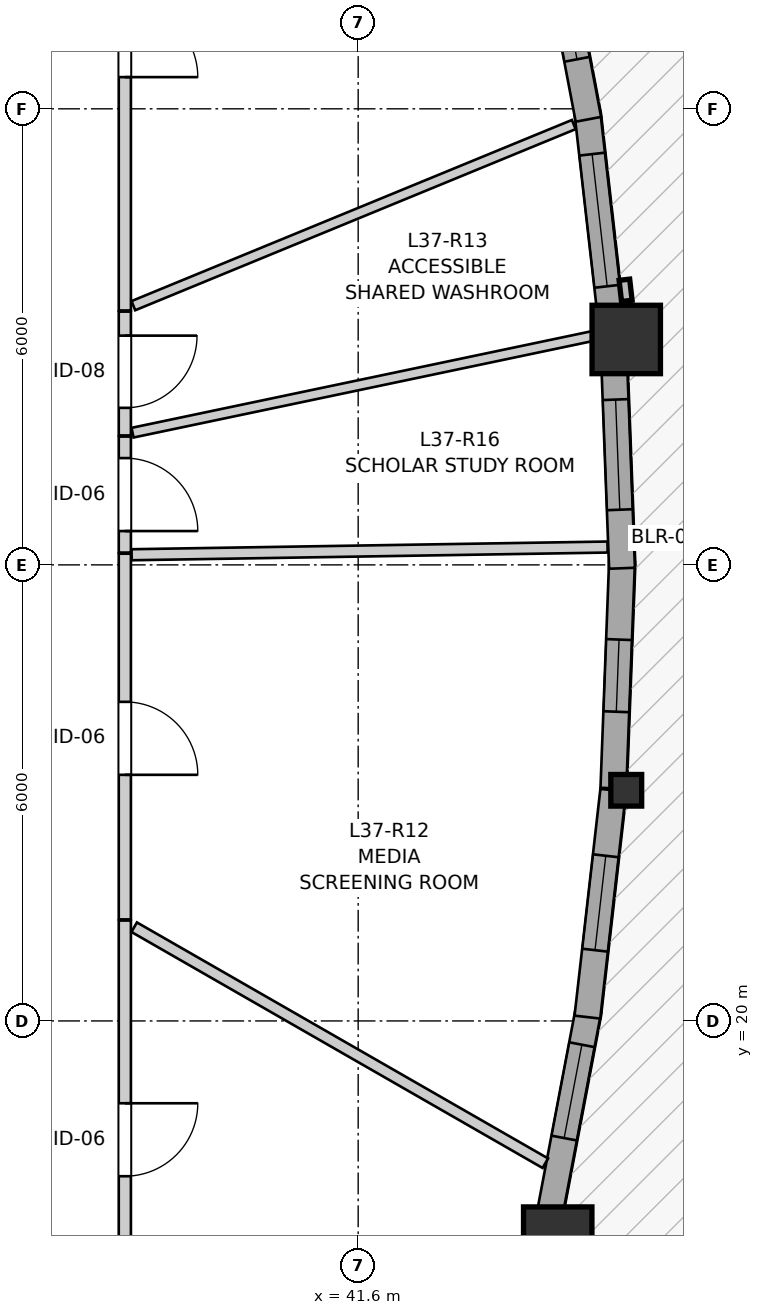
"""IFC4 building model, lengths in metres.
Left out: names, types, materials, properties, quantities, classifications, styles, units other than length and angle.
Written with IfcOpenShell. Run it as: python <this file> out.ifc"""

import sys

from ifc_helpers import new_model, si_unit, direction, frame, frame_2d, origin, origin_2d, place, context, subcontext, project, spatial, rectangle, i_section, extrude, source, transform, mapped, element, fill, save


model = new_model("IFC4")
c1 = context("Model", 3, precision=1e-05, world=origin(), true_north=direction((0.0, 1.0)))
c2 = subcontext(c1, "Body", "Model", "MODEL_VIEW")
j1 = project(units=[si_unit("LENGTHUNIT", "METRE"), si_unit("PLANEANGLEUNIT", "RADIAN")], contexts=[c1])
p1 = place(None, origin())
s1 = spatial("IfcSite", under=j1, at=p1, CompositionType="ELEMENT")
p2 = place(p1, origin())
s2 = spatial("IfcBuilding", under=s1, at=p2, CompositionType="ELEMENT")
p3 = place(p2, frame((0.0, 0.0, 124.8)))
s3 = spatial("IfcBuildingStorey", under=s2, at=p3, CompositionType="ELEMENT", Elevation=124.8)
m1 = source(origin(), c2, "Body", "SweptSolid", [
    extrude(rectangle(XDim=0.9, YDim=0.9, at=origin_2d()), origin(), (0.0, 0.0, 1.0), 2.9),
])
p4 = place(p3, frame((44.226, 17.104, 0.0), z_axis=(0.0, 0.0, 1.0), x_axis=(1.0, 0.0, 0.0)))
e1 = element("IfcColumn", 1, at=p4, inside=s3, PredefinedType="COLUMN", context=c2, shape_type="MappedRepresentation", body=[
    mapped(m1, transform((0.0, 0.0, 0.0), x_axis=(1.0, 0.0, 0.0), y_axis=(0.0, 1.0, 0.0), z_axis=(0.0, 0.0, 1.0), scale=1.0)),
])
m2 = source(origin(), c2, "Body", "SweptSolid", [
    extrude(i_section(OverallWidth=0.406, OverallDepth=0.416, WebThickness=0.027, FlangeThickness=0.044, FilletRadius=0.015, at=origin_2d()), origin(), (0.0, 0.0, 1.0), 2.9),
])
p5 = place(p3, frame((45.127, 23.034, 0.0), z_axis=(0.0, 0.0, 1.0), x_axis=(1.0, 0.0, 0.0)))
e2 = element("IfcColumn", 2, at=p5, inside=s3, PredefinedType="PILASTER", context=c2, shape_type="MappedRepresentation", body=[
    mapped(m2, transform((0.0, 0.0, 0.0), x_axis=(1.0, 0.0, 0.0), y_axis=(0.0, 1.0, 0.0), z_axis=(0.0, 0.0, 1.0), scale=1.0)),
])
p6 = place(p3, frame((45.127, 28.966, 0.0), z_axis=(0.0, 0.0, 1.0), x_axis=(1.0, 0.0, 0.0)))
e3 = element("IfcColumn", 3, at=p6, inside=s3, PredefinedType="COLUMN", context=c2, shape_type="MappedRepresentation", body=[
    mapped(m1, transform((0.0, 0.0, 0.0), x_axis=(1.0, 0.0, 0.0), y_axis=(0.0, 1.0, 0.0), z_axis=(0.0, 0.0, 1.0), scale=1.0)),
])
p7 = place(p3, frame((44.101, 17.361, 0.0), z_axis=(0.0, 0.0, 1.0), x_axis=(0.186739007234, 0.982409559795, 0.0)))
e4 = element("IfcWall", 4, at=p7, inside=s3, PredefinedType="SOLIDWALL", context=c2, shape_type="SweptSolid", body=[
    extrude(rectangle(XDim=2.827, YDim=0.34, at=frame_2d((1.413, 0.0))), origin(), (0.0, 0.0, 1.0), 2.43),
])
p8 = place(p7, frame((1.118, 0.0, 0.82)))
e5 = element("IfcOpeningElement", 5, at=p8, cuts=e4, PredefinedType="OPENING", context=c2, shape_type="SweptSolid", body=[
    extrude(rectangle(XDim=1.25, YDim=1.35, at=frame_2d((0.625, 0.675))), frame((0.0, 0.18, 0.0), z_axis=(0.0, -1.0, 0.0), x_axis=(1.0, 0.0, 0.0)), (0.0, 0.0, 1.0), 0.36),
])
p9 = place(p3, frame((44.616, 20.05, 0.0), z_axis=(0.0, 0.0, 1.0), x_axis=(0.113250801133, 0.993566432627, 0.0)))
e6 = element("IfcWall", 6, at=p9, inside=s3, PredefinedType="SOLIDWALL", context=c2, shape_type="SweptSolid", body=[
    extrude(rectangle(XDim=3.003, YDim=0.34, at=frame_2d((1.501, 0.0))), origin(), (0.0, 0.0, 1.0), 2.43),
])
p10 = place(p9, frame((0.886, 0.0, 0.82)))
e7 = element("IfcOpeningElement", 7, at=p10, cuts=e6, PredefinedType="OPENING", context=c2, shape_type="SweptSolid", body=[
    extrude(rectangle(XDim=1.25, YDim=1.35, at=frame_2d((0.625, 0.675))), frame((0.0, 0.18, 0.0), z_axis=(0.0, -1.0, 0.0), x_axis=(1.0, 0.0, 0.0)), (0.0, 0.0, 1.0), 0.36),
])
p11 = place(p3, frame((44.958, 23.061, 0.0), z_axis=(0.0, 0.0, 1.0), x_axis=(0.037940097137, 0.999280015326, 0.0)))
e8 = element("IfcWall", 8, at=p11, inside=s3, PredefinedType="SOLIDWALL", context=c2, shape_type="SweptSolid", body=[
    extrude(rectangle(XDim=2.986, YDim=0.34, at=frame_2d((1.493, 0.0))), origin(), (0.0, 0.0, 1.0), 2.43),
])
p12 = place(p11, frame((1.008, 0.0, 0.82)))
e9 = element("IfcOpeningElement", 9, at=p12, cuts=e8, PredefinedType="OPENING", context=c2, shape_type="SweptSolid", body=[
    extrude(rectangle(XDim=0.95, YDim=1.35, at=frame_2d((0.475, 0.675))), frame((0.0, 0.18, 0.0), z_axis=(0.0, -1.0, 0.0), x_axis=(1.0, 0.0, 0.0)), (0.0, 0.0, 1.0), 0.36),
])
p13 = place(p3, frame((45.071, 25.956, 0.0), z_axis=(0.0, 0.0, 1.0), x_axis=(-0.037997361734, 0.999277839493, 0.0)))
e10 = element("IfcWall", 10, at=p13, inside=s3, PredefinedType="SOLIDWALL", context=c2, shape_type="SweptSolid", body=[
    extrude(rectangle(XDim=2.776, YDim=0.34, at=frame_2d((1.388, 0.0))), origin(), (0.0, 0.0, 1.0), 2.43),
])
p14 = place(p13, frame((0.771, 0.0, 0.82)))
e11 = element("IfcOpeningElement", 11, at=p14, cuts=e10, PredefinedType="OPENING", context=c2, shape_type="SweptSolid", body=[
    extrude(rectangle(XDim=1.45, YDim=1.25, at=frame_2d((0.725, 0.625))), frame((0.0, 0.18, 0.0), z_axis=(0.0, -1.0, 0.0), x_axis=(1.0, 0.0, 0.0)), (0.0, 0.0, 1.0), 0.36),
])
p15 = place(p3, frame((44.932, 29.175, 0.0), z_axis=(0.0, 0.0, 1.0), x_axis=(-0.113290188042, 0.993561942354, 0.0)))
e12 = element("IfcWall", 12, at=p15, inside=s3, PredefinedType="SOLIDWALL", context=c2, shape_type="SweptSolid", body=[
    extrude(rectangle(XDim=2.793, YDim=0.34, at=frame_2d((1.396, 0.0))), origin(), (0.0, 0.0, 1.0), 2.43),
])
p16 = place(p15, frame((0.493, 0.0, 0.82)))
e13 = element("IfcOpeningElement", 13, at=p16, cuts=e12, PredefinedType="OPENING", context=c2, shape_type="SweptSolid", body=[
    extrude(rectangle(XDim=1.75, YDim=1.3, at=frame_2d((0.875, 0.65))), frame((0.0, 0.18, 0.0), z_axis=(0.0, -1.0, 0.0), x_axis=(1.0, 0.0, 0.0)), (0.0, 0.0, 1.0), 0.36),
])
p17 = place(p3, frame((44.629, 31.862, 0.0), z_axis=(0.0, 0.0, 1.0), x_axis=(-0.186690909565, 0.982418701108, 0.0)))
e14 = element("IfcWall", 14, at=p17, inside=s3, PredefinedType="SOLIDWALL", context=c2, shape_type="SweptSolid", body=[
    extrude(rectangle(XDim=3.037, YDim=0.34, at=frame_2d((1.518, 0.0))), origin(), (0.0, 0.0, 1.0), 2.43),
])
p18 = place(p17, frame((0.803, 0.0, 0.82)))
e15 = element("IfcOpeningElement", 15, at=p18, cuts=e14, PredefinedType="OPENING", context=c2, shape_type="SweptSolid", body=[
    extrude(rectangle(XDim=1.45, YDim=1.25, at=frame_2d((0.725, 0.625))), frame((0.0, 0.18, 0.0), z_axis=(0.0, -1.0, 0.0), x_axis=(1.0, 0.0, 0.0)), (0.0, 0.0, 1.0), 0.36),
])
p19 = place(p3, frame((38.53, 36.43, 0.0), z_axis=(0.0, 0.0, 1.0), x_axis=(0.0, -1.0, 0.0)))
e16 = element("IfcWall", 16, at=p19, inside=s3, PredefinedType="PARTITIONING", context=c2, shape_type="SweptSolid", body=[
    extrude(rectangle(XDim=7.083, YDim=0.16, at=frame_2d((3.542, 0.0))), origin(), (0.0, 0.0, 1.0), 2.538),
])
p20 = place(p19, frame((3.053, 0.0, 0.0)))
e17 = element("IfcOpeningElement", 17, at=p20, cuts=e16, PredefinedType="OPENING", context=c2, shape_type="SweptSolid", body=[
    extrude(rectangle(XDim=0.96, YDim=2.1, at=frame_2d((0.48, 1.05))), frame((0.0, 0.09, 0.0), z_axis=(0.0, -1.0, 0.0), x_axis=(1.0, 0.0, 0.0)), (0.0, 0.0, 1.0), 0.18),
])
p21 = place(p3, frame((38.53, 21.321, 0.0), z_axis=(0.0, 0.0, 1.0), x_axis=(0.0, -1.0, 0.0)))
e18 = element("IfcWall", 18, at=p21, inside=s3, PredefinedType="PARTITIONING", context=c2, shape_type="SweptSolid", body=[
    extrude(rectangle(XDim=5.751, YDim=0.16, at=frame_2d((2.875, 0.0))), origin(), (0.0, 0.0, 1.0), 2.9),
])
p22 = place(p21, frame((2.404, 0.0, 0.0)))
e19 = element("IfcOpeningElement", 19, at=p22, cuts=e18, PredefinedType="OPENING", context=c2, shape_type="SweptSolid", body=[
    extrude(rectangle(XDim=0.96, YDim=2.1, at=frame_2d((0.48, 1.05))), frame((0.0, 0.09, 0.0), z_axis=(0.0, -1.0, 0.0), x_axis=(1.0, 0.0, 0.0)), (0.0, 0.0, 1.0), 0.18),
])
p23 = place(p3, frame((38.53, 26.147, 0.0), z_axis=(0.0, 0.0, 1.0), x_axis=(0.0, -1.0, 0.0)))
e20 = element("IfcWall", 20, at=p23, inside=s3, PredefinedType="PARTITIONING", context=c2, shape_type="SweptSolid", body=[
    extrude(rectangle(XDim=4.811, YDim=0.16, at=frame_2d((2.406, 0.0))), origin(), (0.0, 0.0, 1.0), 2.9),
])
p24 = place(p23, frame((1.949, 0.0, 0.0)))
e21 = element("IfcOpeningElement", 21, at=p24, cuts=e20, PredefinedType="OPENING", context=c2, shape_type="SweptSolid", body=[
    extrude(rectangle(XDim=0.96, YDim=2.1, at=frame_2d((0.48, 1.05))), frame((0.0, 0.09, 0.0), z_axis=(0.0, -1.0, 0.0), x_axis=(1.0, 0.0, 0.0)), (0.0, 0.0, 1.0), 0.18),
])
p25 = place(p3, frame((38.53, 29.332, 0.0), z_axis=(0.0, 0.0, 1.0), x_axis=(0.0, -1.0, 0.0)))
e22 = element("IfcWall", 22, at=p25, inside=s3, PredefinedType="PARTITIONING", context=c2, shape_type="SweptSolid", body=[
    extrude(rectangle(XDim=1.629, YDim=0.16, at=frame_2d((0.814, 0.0))), origin(), (0.0, 0.0, 1.0), 2.9),
])
p26 = place(p25, frame((0.316, 0.0, 0.0)))
e23 = element("IfcOpeningElement", 23, at=p26, cuts=e22, PredefinedType="OPENING", context=c2, shape_type="SweptSolid", body=[
    extrude(rectangle(XDim=0.95, YDim=2.1, at=frame_2d((0.475, 1.05))), frame((0.0, 0.09, 0.0), z_axis=(0.0, -1.0, 0.0), x_axis=(1.0, 0.0, 0.0)), (0.0, 0.0, 1.0), 0.18),
])
p27 = place(p3, frame((38.53, 27.688, 0.0), z_axis=(0.0, 0.0, 1.0), x_axis=(0.0, -1.0, 0.0)))
e24 = element("IfcWall", 24, at=p27, inside=s3, PredefinedType="PARTITIONING", context=c2, shape_type="SweptSolid", body=[
    extrude(rectangle(XDim=1.526, YDim=0.16, at=frame_2d((0.763, 0.0))), origin(), (0.0, 0.0, 1.0), 2.9),
])
p28 = place(p27, frame((0.283, 0.0, 0.0)))
e25 = element("IfcOpeningElement", 25, at=p28, cuts=e24, PredefinedType="OPENING", context=c2, shape_type="SweptSolid", body=[
    extrude(rectangle(XDim=0.96, YDim=2.1, at=frame_2d((0.48, 1.05))), frame((0.0, 0.09, 0.0), z_axis=(0.0, -1.0, 0.0), x_axis=(1.0, 0.0, 0.0)), (0.0, 0.0, 1.0), 0.18),
])
p29 = place(p3, frame((38.642, 29.41, 0.0), z_axis=(0.0, 0.0, 1.0), x_axis=(0.924865201518, 0.380295094659, 0.0)))
e26 = element("IfcWall", 26, at=p29, inside=s3, PredefinedType="PARTITIONING", context=c2, shape_type="SweptSolid", body=[
    extrude(rectangle(XDim=6.266, YDim=0.13, at=frame_2d((3.133, 0.0))), origin(), (0.0, 0.0, 1.0), 2.9),
])
p30 = place(p3, frame((38.653, 21.233, 0.0), z_axis=(0.0, 0.0, 1.0), x_axis=(0.86726592845, -0.49784516604, 0.0)))
e27 = element("IfcWall", 27, at=p30, inside=s3, PredefinedType="PARTITIONING", context=c2, shape_type="SweptSolid", body=[
    extrude(rectangle(XDim=6.237, YDim=0.145, at=frame_2d((3.119, 0.0))), origin(), (0.0, 0.0, 1.0), 2.9),
])
p31 = place(p3, frame((38.631, 27.739, 0.0), z_axis=(0.0, 0.0, 1.0), x_axis=(0.978654667538, 0.205511658323, 0.0)))
e28 = element("IfcWall", 28, at=p31, inside=s3, PredefinedType="PARTITIONING", context=c2, shape_type="SweptSolid", body=[
    extrude(rectangle(XDim=6.29, YDim=0.13, at=frame_2d((3.145, 0.0))), origin(), (0.0, 0.0, 1.0), 2.318),
])
p32 = place(p3, frame((38.619, 26.133, 0.0), z_axis=(0.0, 0.0, 1.0), x_axis=(0.999869130012, 0.016177850558, 0.0)))
e29 = element("IfcWall", 29, at=p32, inside=s3, PredefinedType="PARTITIONING", context=c2, shape_type="SweptSolid", body=[
    extrude(rectangle(XDim=6.263, YDim=0.145, at=frame_2d((3.131, 0.0))), origin(), (0.0, 0.0, 1.0), 2.9),
])
m3 = source(origin(), c2, "Body", "SweptSolid", [
    extrude(rectangle(XDim=1.25, YDim=1.35, at=frame_2d((0.625, 0.675))), frame((0.0, 0.03, 0.0), z_axis=(0.0, -1.0, 0.0), x_axis=(1.0, 0.0, 0.0)), (0.0, 0.0, 1.0), 0.06),
])
p33 = place(p8, origin())
e30 = element("IfcWindow", 30, at=p33, inside=s3, PartitioningType="SINGLE_PANEL", PredefinedType="WINDOW", context=c2, shape_type="MappedRepresentation", body=[
    mapped(m3, transform((0.0, 0.0, 0.0), x_axis=(1.0, 0.0, 0.0), y_axis=(0.0, 1.0, 0.0), z_axis=(0.0, 0.0, 1.0), scale=1.0)),
])
fill(e5, e30)
p34 = place(p10, origin())
e31 = element("IfcWindow", 31, at=p34, inside=s3, PartitioningType="SINGLE_PANEL", PredefinedType="WINDOW", context=c2, shape_type="MappedRepresentation", body=[
    mapped(m3, transform((0.0, 0.0, 0.0), x_axis=(1.0, 0.0, 0.0), y_axis=(0.0, 1.0, 0.0), z_axis=(0.0, 0.0, 1.0), scale=1.0)),
])
fill(e7, e31)
m4 = source(origin(), c2, "Body", "SweptSolid", [
    extrude(rectangle(XDim=0.95, YDim=1.35, at=frame_2d((0.475, 0.675))), frame((0.0, 0.03, 0.0), z_axis=(0.0, -1.0, 0.0), x_axis=(1.0, 0.0, 0.0)), (0.0, 0.0, 1.0), 0.06),
])
p35 = place(p12, origin())
e32 = element("IfcWindow", 32, at=p35, inside=s3, PartitioningType="SINGLE_PANEL", PredefinedType="WINDOW", context=c2, shape_type="MappedRepresentation", body=[
    mapped(m4, transform((0.0, 0.0, 0.0), x_axis=(1.0, 0.0, 0.0), y_axis=(0.0, 1.0, 0.0), z_axis=(0.0, 0.0, 1.0), scale=1.0)),
])
fill(e9, e32)
m5 = source(origin(), c2, "Body", "SweptSolid", [
    extrude(rectangle(XDim=1.45, YDim=1.25, at=frame_2d((0.725, 0.625))), frame((0.0, 0.03, 0.0), z_axis=(0.0, -1.0, 0.0), x_axis=(1.0, 0.0, 0.0)), (0.0, 0.0, 1.0), 0.06),
])
p36 = place(p14, origin())
e33 = element("IfcWindow", 33, at=p36, inside=s3, PartitioningType="SINGLE_PANEL", PredefinedType="WINDOW", context=c2, shape_type="MappedRepresentation", body=[
    mapped(m5, transform((0.0, 0.0, 0.0), x_axis=(1.0, 0.0, 0.0), y_axis=(0.0, 1.0, 0.0), z_axis=(0.0, 0.0, 1.0), scale=1.0)),
])
fill(e11, e33)
m6 = source(origin(), c2, "Body", "SweptSolid", [
    extrude(rectangle(XDim=1.75, YDim=1.3, at=frame_2d((0.875, 0.65))), frame((0.0, 0.03, 0.0), z_axis=(0.0, -1.0, 0.0), x_axis=(1.0, 0.0, 0.0)), (0.0, 0.0, 1.0), 0.06),
])
p37 = place(p16, origin())
e34 = element("IfcWindow", 34, at=p37, inside=s3, PartitioningType="SINGLE_PANEL", PredefinedType="WINDOW", context=c2, shape_type="MappedRepresentation", body=[
    mapped(m6, transform((0.0, 0.0, 0.0), x_axis=(1.0, 0.0, 0.0), y_axis=(0.0, 1.0, 0.0), z_axis=(0.0, 0.0, 1.0), scale=1.0)),
])
fill(e13, e34)
p38 = place(p18, origin())
e35 = element("IfcWindow", 35, at=p38, inside=s3, PartitioningType="SINGLE_PANEL", PredefinedType="WINDOW", context=c2, shape_type="MappedRepresentation", body=[
    mapped(m5, transform((0.0, 0.0, 0.0), x_axis=(1.0, 0.0, 0.0), y_axis=(0.0, 1.0, 0.0), z_axis=(0.0, 0.0, 1.0), scale=1.0)),
])
fill(e15, e35)
m7 = source(origin(), c2, "Body", "SweptSolid", [
    extrude(rectangle(XDim=0.96, YDim=2.1, at=frame_2d((0.48, 1.05))), frame((0.0, 0.025, 0.0), z_axis=(0.0, -1.0, 0.0), x_axis=(1.0, 0.0, 0.0)), (0.0, 0.0, 1.0), 0.05),
])
p39 = place(p20, origin())
e36 = element("IfcDoor", 36, at=p39, inside=s3, OperationType="SINGLE_SWING_RIGHT", PredefinedType="DOOR", context=c2, shape_type="MappedRepresentation", body=[
    mapped(m7, transform((0.0, 0.0, 0.0), x_axis=(1.0, 0.0, 0.0), y_axis=(0.0, 1.0, 0.0), z_axis=(0.0, 0.0, 1.0), scale=1.0)),
])
fill(e17, e36)
p40 = place(p22, origin())
e37 = element("IfcDoor", 37, at=p40, inside=s3, OperationType="SINGLE_SWING_LEFT", PredefinedType="DOOR", context=c2, shape_type="MappedRepresentation", body=[
    mapped(m7, transform((0.0, 0.0, 0.0), x_axis=(1.0, 0.0, 0.0), y_axis=(0.0, 1.0, 0.0), z_axis=(0.0, 0.0, 1.0), scale=1.0)),
])
fill(e19, e37)
p41 = place(p24, origin())
e38 = element("IfcDoor", 38, at=p41, inside=s3, OperationType="SINGLE_SWING_RIGHT", PredefinedType="DOOR", context=c2, shape_type="MappedRepresentation", body=[
    mapped(m7, transform((0.0, 0.0, 0.0), x_axis=(1.0, 0.0, 0.0), y_axis=(0.0, 1.0, 0.0), z_axis=(0.0, 0.0, 1.0), scale=1.0)),
])
fill(e21, e38)
m8 = source(origin(), c2, "Body", "SweptSolid", [
    extrude(rectangle(XDim=0.95, YDim=2.1, at=frame_2d((0.475, 1.05))), frame((0.0, 0.025, 0.0), z_axis=(0.0, -1.0, 0.0), x_axis=(1.0, 0.0, 0.0)), (0.0, 0.0, 1.0), 0.05),
])
p42 = place(p26, origin())
e39 = element("IfcDoor", 39, at=p42, inside=s3, OperationType="SINGLE_SWING_LEFT", PredefinedType="DOOR", context=c2, shape_type="MappedRepresentation", body=[
    mapped(m8, transform((0.0, 0.0, 0.0), x_axis=(1.0, 0.0, 0.0), y_axis=(0.0, 1.0, 0.0), z_axis=(0.0, 0.0, 1.0), scale=1.0)),
])
fill(e23, e39)
p43 = place(p28, origin())
e40 = element("IfcDoor", 40, at=p43, inside=s3, OperationType="SINGLE_SWING_RIGHT", PredefinedType="DOOR", context=c2, shape_type="MappedRepresentation", body=[
    mapped(m7, transform((0.0, 0.0, 0.0), x_axis=(1.0, 0.0, 0.0), y_axis=(0.0, 1.0, 0.0), z_axis=(0.0, 0.0, 1.0), scale=1.0)),
])
fill(e25, e40)
save(model, sys.argv[1])
